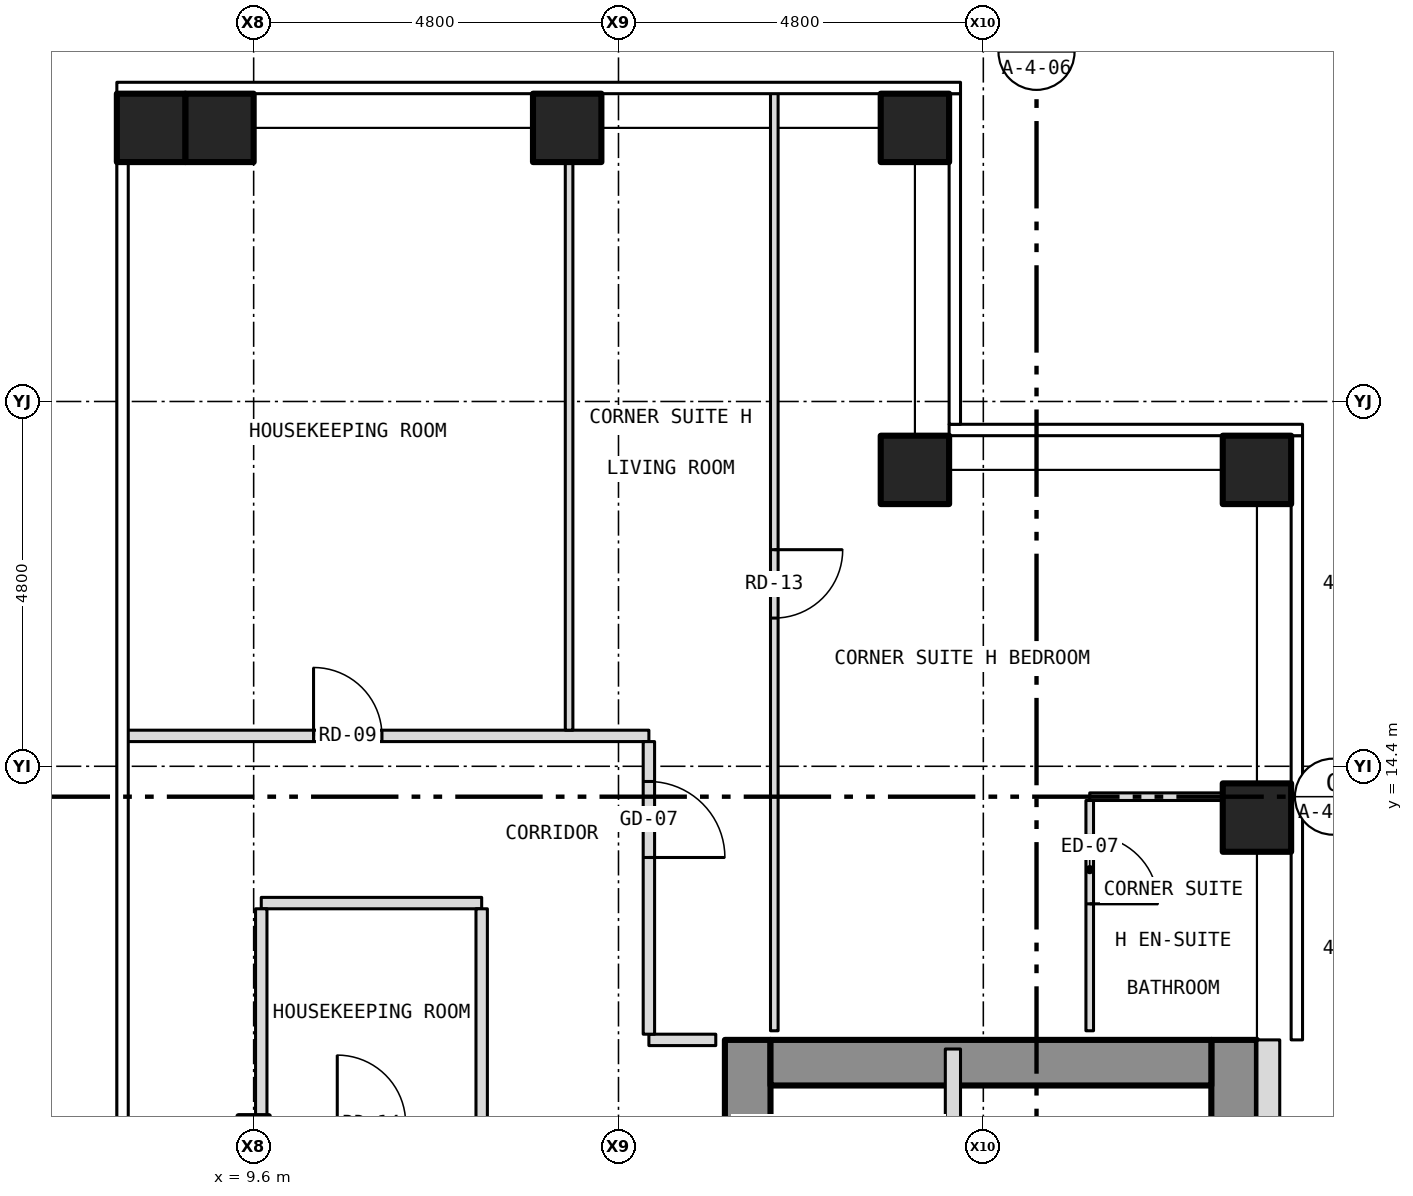
"""IFC4 building model, lengths in metres.
Left out: names, types, materials, properties, quantities, classifications, styles, units other than length and angle.
Written with IfcOpenShell. Run it as: python <this file> out.ifc"""

import sys

from ifc_helpers import new_model, si_unit, direction, frame, frame_2d, origin, origin_2d, place, context, subcontext, project, spatial, rectangle, hollow_rectangle, extrude, element, fill, save


model = new_model("IFC4")
c1 = context("Model", 3, precision=1e-05, world=origin(), true_north=direction((0.0, 1.0)))
c2 = subcontext(c1, "Body", "Model", "MODEL_VIEW")
j1 = project(units=[si_unit("LENGTHUNIT", "METRE"), si_unit("PLANEANGLEUNIT", "RADIAN")], contexts=[c1])
p1 = place(None, origin())
s1 = spatial("IfcSite", under=j1, at=p1, CompositionType="ELEMENT")
p2 = place(p1, origin())
s2 = spatial("IfcBuilding", under=s1, at=p2, CompositionType="ELEMENT")
p3 = place(p2, frame((0.0, 0.0, 134.5)))
s3 = spatial("IfcBuildingStorey", under=s2, at=p3, CompositionType="ELEMENT", Elevation=134.5)
for number, where, z_axis, x_axis in (
    (1, (9.15, 22.8, -0.15), (0.0, 0.0, 1.0), (1.0, 0.0, 0.0)),
    (2, (13.725, 22.8, -0.15), (0.0, 0.0, 1.0), (1.0, 0.0, 0.0)),
    (3, (18.3, 22.8, -0.15), (0.0, 0.0, 1.0), (1.0, 0.0, 0.0)),
    (4, (22.8, 13.725, -0.15), (0.0, 0.0, 1.0), (1.0, 0.0, 0.0)),
    (5, (22.8, 18.3, -0.15), (0.0, 0.0, 1.0), (1.0, 0.0, 0.0)),
    (6, (18.3, 18.3, -0.15), (0.0, 0.0, 1.0), (1.0, 0.0, 0.0)),
    (7, (8.25, 22.8, -0.15), (0.0, 0.0, 1.0), (1.0, 0.0, 0.0)),
):
    element("IfcColumn", number, at=place(p3, frame(where, z_axis=z_axis, x_axis=x_axis)), inside=s3, PredefinedType="COLUMN", context=c2, shape_type="SweptSolid", body=[
        extrude(hollow_rectangle(XDim=0.9, YDim=0.9, WallThickness=0.05, at=origin_2d()), origin(), (0.0, 0.0, 1.0), 3.35),
    ])
p4 = place(p3, frame((16.1, -10.8, 0.0), z_axis=(0.0, 0.0, 1.0), x_axis=(0.0, 1.0, 0.0)))
e8 = element("IfcWall", 8, at=p4, inside=s3, PredefinedType="SHEAR", context=c2, shape_type="SweptSolid", body=[
    extrude(rectangle(XDim=21.6, YDim=0.6, at=frame_2d((10.8, 0.0))), origin(), (0.0, 0.0, 1.0), 2.9),
])
p5 = place(p4, frame((9.4, 0.0, 0.0)))
e9 = element("IfcOpeningElement", 9, at=p5, cuts=e8, PredefinedType="OPENING", context=c2, shape_type="SweptSolid", body=[
    extrude(rectangle(XDim=1.1, YDim=2.1, at=frame_2d((0.55, 1.05))), frame((0.0, 0.312, 0.0), z_axis=(0.0, -1.0, 0.0), x_axis=(1.0, 0.0, 0.0)), (0.0, 0.0, 1.0), 0.624),
])
p6 = place(p4, frame((11.5, 0.0, 0.0)))
e10 = element("IfcOpeningElement", 10, at=p6, cuts=e8, PredefinedType="OPENING", context=c2, shape_type="SweptSolid", body=[
    extrude(rectangle(XDim=1.1, YDim=2.1, at=frame_2d((0.55, 1.05))), frame((0.0, 0.312, 0.0), z_axis=(0.0, -1.0, 0.0), x_axis=(1.0, 0.0, 0.0)), (0.0, 0.0, 1.0), 0.624),
])
p7 = place(p4, frame((13.6, 0.0, 0.0)))
e11 = element("IfcOpeningElement", 11, at=p7, cuts=e8, PredefinedType="OPENING", context=c2, shape_type="SweptSolid", body=[
    extrude(rectangle(XDim=1.1, YDim=2.1, at=frame_2d((0.55, 1.05))), frame((0.0, 0.312, 0.0), z_axis=(0.0, -1.0, 0.0), x_axis=(1.0, 0.0, 0.0)), (0.0, 0.0, 1.0), 0.624),
])
p8 = place(p4, frame((15.7, 0.0, 0.0)))
e12 = element("IfcOpeningElement", 12, at=p8, cuts=e8, PredefinedType="OPENING", context=c2, shape_type="SweptSolid", body=[
    extrude(rectangle(XDim=1.1, YDim=2.1, at=frame_2d((0.55, 1.05))), frame((0.0, 0.312, 0.0), z_axis=(0.0, -1.0, 0.0), x_axis=(1.0, 0.0, 0.0)), (0.0, 0.0, 1.0), 0.624),
])
p9 = place(p4, frame((17.8, 0.0, 0.0)))
e13 = element("IfcOpeningElement", 13, at=p9, cuts=e8, PredefinedType="OPENING", context=c2, shape_type="SweptSolid", body=[
    extrude(rectangle(XDim=1.1, YDim=2.1, at=frame_2d((0.55, 1.05))), frame((0.0, 0.312, 0.0), z_axis=(0.0, -1.0, 0.0), x_axis=(1.0, 0.0, 0.0)), (0.0, 0.0, 1.0), 0.624),
])
p10 = place(p4, frame((5.642, 0.0, 0.0)))
e14 = element("IfcOpeningElement", 14, at=p10, cuts=e8, PredefinedType="OPENING", context=c2, shape_type="SweptSolid", body=[
    extrude(rectangle(XDim=1.1, YDim=2.1, at=frame_2d((0.55, 1.05))), frame((0.0, 0.312, 0.0), z_axis=(0.0, -1.0, 0.0), x_axis=(1.0, 0.0, 0.0)), (0.0, 0.0, 1.0), 0.624),
])
p11 = place(p4, frame((7.5, 0.0, 0.0)))
e15 = element("IfcOpeningElement", 15, at=p11, cuts=e8, PredefinedType="OPENING", context=c2, shape_type="SweptSolid", body=[
    extrude(rectangle(XDim=1.1, YDim=2.1, at=frame_2d((0.55, 1.05))), frame((0.0, 0.312, 0.0), z_axis=(0.0, -1.0, 0.0), x_axis=(1.0, 0.0, 0.0)), (0.0, 0.0, 1.0), 0.624),
])
p12 = place(p3, frame((22.5, -10.8, 0.0), z_axis=(0.0, 0.0, 1.0), x_axis=(0.0, 1.0, 0.0)))
e16 = element("IfcWall", 16, at=p12, inside=s3, PredefinedType="SHEAR", context=c2, shape_type="SweptSolid", body=[
    extrude(rectangle(XDim=21.6, YDim=0.6, at=frame_2d((10.8, 0.0))), origin(), (0.0, 0.0, 1.0), 2.9),
])
p13 = place(p3, frame((16.4, 10.5, 0.0), z_axis=(0.0, 0.0, 1.0), x_axis=(1.0, 0.0, 0.0)))
e17 = element("IfcWall", 17, at=p13, inside=s3, PredefinedType="SHEAR", context=c2, shape_type="SweptSolid", body=[
    extrude(rectangle(XDim=5.8, YDim=0.6, at=frame_2d((2.9, 0.0))), origin(), (0.0, 0.0, 1.0), 2.9),
])
p14 = place(p3, frame((22.95, -10.8, 0.0), z_axis=(0.0, 0.0, 1.0), x_axis=(0.0, 1.0, 0.0)))
e18 = element("IfcWall", 18, at=p14, inside=s3, PredefinedType="SOLIDWALL", context=c2, shape_type="SweptSolid", body=[
    extrude(rectangle(XDim=21.6, YDim=0.3, at=frame_2d((10.8, 0.0))), origin(), (0.0, 0.0, 1.0), 3.5),
])
p15 = place(p14, frame((2.95, 0.0, 1.0)))
e19 = element("IfcOpeningElement", 19, at=p15, cuts=e18, PredefinedType="OPENING", context=c2, shape_type="SweptSolid", body=[
    extrude(rectangle(XDim=0.6, YDim=1.5, at=frame_2d((0.3, 0.75))), frame((0.0, 0.162, 0.0), z_axis=(0.0, -1.0, 0.0), x_axis=(1.0, 0.0, 0.0)), (0.0, 0.0, 1.0), 0.324),
])
p16 = place(p3, frame((14.8, 10.8, 0.0), z_axis=(0.0, 0.0, 1.0), x_axis=(1.0, 0.0, 0.0)))
e20 = element("IfcWall", 20, at=p16, inside=s3, PredefinedType="PARTITIONING", context=c2, shape_type="SweptSolid", body=[
    extrude(rectangle(XDim=0.88, YDim=0.15, at=frame_2d((0.44, 0.0))), origin(), (0.0, 0.0, 1.0), 3.2),
])
p17 = place(p3, frame((9.7, 12.6, 0.0), z_axis=(0.0, 0.0, 1.0), x_axis=(1.0, 0.0, 0.0)))
e21 = element("IfcWall", 21, at=p17, inside=s3, PredefinedType="PARTITIONING", context=c2, shape_type="SweptSolid", body=[
    extrude(rectangle(XDim=2.9, YDim=0.15, at=frame_2d((1.45, 0.0))), origin(), (0.0, 0.0, 1.0), 3.2),
])
p18 = place(p3, frame((20.6, 14.0, 0.0), z_axis=(0.0, 0.0, 1.0), x_axis=(1.0, 0.0, 0.0)))
e22 = element("IfcWall", 22, at=p18, inside=s3, PredefinedType="PARTITIONING", context=c2, shape_type="SweptSolid", body=[
    extrude(rectangle(XDim=2.08, YDim=0.1, at=frame_2d((1.04, 0.0))), origin(), (0.0, 0.0, 1.0), 3.2),
])
p19 = place(p3, frame((7.92, 14.8, 0.0), z_axis=(0.0, 0.0, 1.0), x_axis=(1.0, 0.0, 0.0)))
e23 = element("IfcWall", 23, at=p19, inside=s3, PredefinedType="PARTITIONING", context=c2, shape_type="SweptSolid", body=[
    extrude(rectangle(XDim=6.88, YDim=0.15, at=frame_2d((3.44, 0.0))), origin(), (0.0, 0.0, 1.0), 3.2),
])
p20 = place(p19, frame((2.468, 0.0, 0.0)))
e24 = element("IfcOpeningElement", 24, at=p20, cuts=e23, PredefinedType="OPENING", context=c2, shape_type="SweptSolid", body=[
    extrude(rectangle(XDim=0.9, YDim=2.1, at=frame_2d((0.45, 1.05))), frame((0.0, 0.087, 0.0), z_axis=(0.0, -1.0, 0.0), x_axis=(1.0, 0.0, 0.0)), (0.0, 0.0, 1.0), 0.174),
])
p21 = place(p3, frame((9.7, 9.775, 0.0), z_axis=(0.0, 0.0, 1.0), x_axis=(0.0, 1.0, 0.0)))
e25 = element("IfcWall", 25, at=p21, inside=s3, PredefinedType="PARTITIONING", context=c2, shape_type="SweptSolid", body=[
    extrude(rectangle(XDim=2.75, YDim=0.15, at=frame_2d((1.375, 0.0))), origin(), (0.0, 0.0, 1.0), 2.578),
])
p22 = place(p3, frame((12.6, 9.775, 0.0), z_axis=(0.0, 0.0, 1.0), x_axis=(0.0, 1.0, 0.0)))
e26 = element("IfcWall", 26, at=p22, inside=s3, PredefinedType="PARTITIONING", context=c2, shape_type="SweptSolid", body=[
    extrude(rectangle(XDim=2.75, YDim=0.15, at=frame_2d((1.375, 0.0))), origin(), (0.0, 0.0, 1.0), 3.2),
])
p23 = place(p3, frame((13.75, 14.875, 0.0), z_axis=(0.0, 0.0, 1.0), x_axis=(0.0, 1.0, 0.0)))
e27 = element("IfcWall", 27, at=p23, inside=s3, PredefinedType="PARTITIONING", context=c2, shape_type="SweptSolid", body=[
    extrude(rectangle(XDim=7.805, YDim=0.1, at=frame_2d((3.902, 0.0))), origin(), (0.0, 0.0, 1.0), 3.2),
])
p24 = place(p3, frame((14.8, 10.875, 0.0), z_axis=(0.0, 0.0, 1.0), x_axis=(0.0, 1.0, 0.0)))
e28 = element("IfcWall", 28, at=p24, inside=s3, PredefinedType="PARTITIONING", context=c2, shape_type="SweptSolid", body=[
    extrude(rectangle(XDim=3.85, YDim=0.15, at=frame_2d((1.925, 0.0))), origin(), (0.0, 0.0, 1.0), 3.2),
])
p25 = place(p24, frame((2.325, 0.0, 0.0)))
e29 = element("IfcOpeningElement", 29, at=p25, cuts=e28, PredefinedType="OPENING", context=c2, shape_type="SweptSolid", body=[
    extrude(rectangle(XDim=1.0, YDim=2.1, at=frame_2d((0.5, 1.05))), frame((0.0, 0.087, 0.0), z_axis=(0.0, -1.0, 0.0), x_axis=(1.0, 0.0, 0.0)), (0.0, 0.0, 1.0), 0.174),
])
p26 = place(p3, frame((16.45, 10.92, 0.0), z_axis=(0.0, 0.0, 1.0), x_axis=(0.0, 1.0, 0.0)))
e30 = element("IfcWall", 30, at=p26, inside=s3, PredefinedType="PARTITIONING", context=c2, shape_type="SweptSolid", body=[
    extrude(rectangle(XDim=12.36, YDim=0.1, at=frame_2d((6.18, 0.0))), origin(), (0.0, 0.0, 1.0), 3.2),
])
p27 = place(p26, frame((5.43, 0.0, 0.0)))
e31 = element("IfcOpeningElement", 31, at=p27, cuts=e30, PredefinedType="OPENING", context=c2, shape_type="SweptSolid", body=[
    extrude(rectangle(XDim=0.9, YDim=2.1, at=frame_2d((0.45, 1.05))), frame((0.0, 0.062, 0.0), z_axis=(0.0, -1.0, 0.0), x_axis=(1.0, 0.0, 0.0)), (0.0, 0.0, 1.0), 0.124),
])
p28 = place(p3, frame((18.8, 4.45, 0.0), z_axis=(0.0, 0.0, 1.0), x_axis=(0.0, 1.0, 0.0)))
e32 = element("IfcWall", 32, at=p28, inside=s3, PredefinedType="PARTITIONING", context=c2, shape_type="SweptSolid", body=[
    extrude(rectangle(XDim=6.23, YDim=0.2, at=frame_2d((3.115, 0.0))), origin(), (0.0, 0.0, 1.0), 2.9),
])
p29 = place(p3, frame((20.6, 10.92, 0.0), z_axis=(0.0, 0.0, 1.0), x_axis=(0.0, 1.0, 0.0)))
e33 = element("IfcWall", 33, at=p29, inside=s3, PredefinedType="PARTITIONING", context=c2, shape_type="SweptSolid", body=[
    extrude(rectangle(XDim=3.03, YDim=0.1, at=frame_2d((1.515, 0.0))), origin(), (0.0, 0.0, 1.0), 3.2),
])
p30 = place(p29, frame((1.67, 0.0, 0.0)))
e34 = element("IfcOpeningElement", 34, at=p30, cuts=e33, PredefinedType="OPENING", context=c2, shape_type="SweptSolid", body=[
    extrude(rectangle(XDim=0.9, YDim=2.1, at=frame_2d((0.45, 1.05))), frame((0.0, 0.062, 0.0), z_axis=(0.0, -1.0, 0.0), x_axis=(1.0, 0.0, 0.0)), (0.0, 0.0, 1.0), 0.124),
])
p31 = place(p20, origin())
e35 = element("IfcDoor", 35, at=p31, inside=s3, OperationType="SINGLE_SWING_LEFT", PredefinedType="DOOR", context=c2, shape_type="SweptSolid", body=[
    extrude(rectangle(XDim=0.9, YDim=2.1, at=frame_2d((0.45, 1.05))), frame((0.0, 0.025, 0.0), z_axis=(0.0, -1.0, 0.0), x_axis=(1.0, 0.0, 0.0)), (0.0, 0.0, 1.0), 0.05),
])
fill(e24, e35)
p32 = place(p25, origin())
e36 = element("IfcDoor", 36, at=p32, inside=s3, OperationType="SINGLE_SWING_LEFT", PredefinedType="DOOR", context=c2, shape_type="SweptSolid", body=[
    extrude(rectangle(XDim=1.0, YDim=2.1, at=frame_2d((0.5, 1.05))), frame((0.0, 0.025, 0.0), z_axis=(0.0, -1.0, 0.0), x_axis=(1.0, 0.0, 0.0)), (0.0, 0.0, 1.0), 0.05),
])
fill(e29, e36)
p33 = place(p27, origin())
e37 = element("IfcDoor", 37, at=p33, inside=s3, OperationType="SINGLE_SWING_RIGHT", PredefinedType="DOOR", context=c2, shape_type="SweptSolid", body=[
    extrude(rectangle(XDim=0.9, YDim=2.1, at=frame_2d((0.45, 1.05))), frame((0.0, 0.025, 0.0), z_axis=(0.0, -1.0, 0.0), x_axis=(1.0, 0.0, 0.0)), (0.0, 0.0, 1.0), 0.05),
])
fill(e31, e37)
p34 = place(p30, origin())
e38 = element("IfcDoor", 38, at=p34, inside=s3, OperationType="SINGLE_SWING_LEFT", PredefinedType="DOOR", context=c2, shape_type="SweptSolid", body=[
    extrude(rectangle(XDim=0.9, YDim=2.1, at=frame_2d((0.45, 1.05))), frame((0.0, 0.025, 0.0), z_axis=(0.0, -1.0, 0.0), x_axis=(1.0, 0.0, 0.0)), (0.0, 0.0, 1.0), 0.05),
])
fill(e34, e38)
save(model, sys.argv[1])
